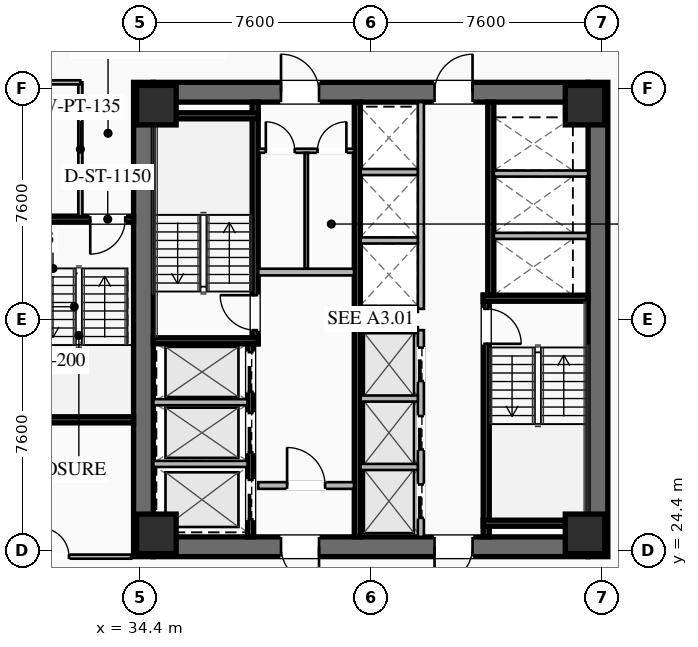
"""IFC4 building model, lengths in metres.
Left out: names, types, materials, properties, quantities, classifications, styles, units other than length and angle.
Written with IfcOpenShell. Run it as: python <this file> out.ifc"""

import sys

from ifc_helpers import new_model, si_unit, direction, frame, frame_2d, origin, origin_2d, place, context, subcontext, project, spatial, rectangle, hollow_rectangle, extrude, element, fill, save


model = new_model("IFC4")
c1 = context("Model", 3, precision=1e-05, world=origin(), true_north=direction((0.0, 1.0)))
c2 = subcontext(c1, "Body", "Model", "MODEL_VIEW")
j1 = project(units=[si_unit("LENGTHUNIT", "METRE"), si_unit("PLANEANGLEUNIT", "RADIAN")], contexts=[c1])
p1 = place(None, origin())
s1 = spatial("IfcSite", under=j1, at=p1, CompositionType="ELEMENT")
p2 = place(p1, origin())
s2 = spatial("IfcBuilding", under=s1, at=p2, CompositionType="ELEMENT")
p3 = place(p2, frame((0.0, 0.0, 38.8)))
s3 = spatial("IfcBuildingStorey", under=s2, at=p3, CompositionType="ELEMENT", Elevation=38.8)
for number, where, z_axis, x_axis in (
    (1, (34.525, 24.2, 0.0), (0.0, 0.0, 1.0), (0.0, 1.0, 0.0)),
    (2, (49.475, 39.8, 0.0), (0.0, 0.0, 1.0), (0.0, -1.0, 0.0)),
):
    element("IfcWall", number, at=place(p3, frame(where, z_axis=z_axis, x_axis=x_axis)), inside=s3, PredefinedType="SHEAR", context=c2, shape_type="SweptSolid", body=[
        extrude(rectangle(XDim=15.6, YDim=0.65, at=frame_2d((7.8, 0.0))), origin(), (0.0, 0.0, 1.0), 3.55),
    ])
p4 = place(p3, frame((49.15, 24.525, 0.0), z_axis=(0.0, 0.0, 1.0), x_axis=(-1.0, 0.0, 0.0)))
e3 = element("IfcWall", 3, at=p4, inside=s3, PredefinedType="SHEAR", context=c2, shape_type="SweptSolid", body=[
    extrude(rectangle(XDim=14.3, YDim=0.65, at=frame_2d((7.15, 0.0))), origin(), (0.0, 0.0, 1.0), 3.55),
])
p5 = place(p4, frame((8.85, 0.0, 0.0)))
e4 = element("IfcOpeningElement", 4, at=p5, cuts=e3, PredefinedType="OPENING", context=c2, shape_type="SweptSolid", body=[
    extrude(rectangle(XDim=1.25, YDim=2.25, at=frame_2d((0.625, 1.125))), frame((0.0, 0.335, 0.0), z_axis=(0.0, -1.0, 0.0), x_axis=(1.0, 0.0, 0.0)), (0.0, 0.0, 1.0), 0.67),
])
p6 = place(p4, frame((3.8, 0.0, 0.0)))
e5 = element("IfcOpeningElement", 5, at=p6, cuts=e3, PredefinedType="OPENING", context=c2, shape_type="SweptSolid", body=[
    extrude(rectangle(XDim=1.25, YDim=2.25, at=frame_2d((0.625, 1.125))), frame((0.0, 0.335, 0.0), z_axis=(0.0, -1.0, 0.0), x_axis=(1.0, 0.0, 0.0)), (0.0, 0.0, 1.0), 0.67),
])
p7 = place(p3, frame((34.85, 39.475, 0.0), z_axis=(0.0, 0.0, 1.0), x_axis=(1.0, 0.0, 0.0)))
e6 = element("IfcWall", 6, at=p7, inside=s3, PredefinedType="SHEAR", context=c2, shape_type="SweptSolid", body=[
    extrude(rectangle(XDim=14.3, YDim=0.65, at=frame_2d((7.15, 0.0))), origin(), (0.0, 0.0, 1.0), 3.55),
])
p8 = place(p7, frame((4.2, 0.0, 0.0)))
e7 = element("IfcOpeningElement", 7, at=p8, cuts=e6, PredefinedType="OPENING", context=c2, shape_type="SweptSolid", body=[
    extrude(rectangle(XDim=1.25, YDim=2.25, at=frame_2d((0.625, 1.125))), frame((0.0, 0.335, 0.0), z_axis=(0.0, -1.0, 0.0), x_axis=(1.0, 0.0, 0.0)), (0.0, 0.0, 1.0), 0.67),
])
p9 = place(p7, frame((9.25, 0.0, 0.0)))
e8 = element("IfcOpeningElement", 8, at=p9, cuts=e6, PredefinedType="OPENING", context=c2, shape_type="SweptSolid", body=[
    extrude(rectangle(XDim=1.25, YDim=2.25, at=frame_2d((0.625, 1.125))), frame((0.0, 0.335, 0.0), z_axis=(0.0, -1.0, 0.0), x_axis=(1.0, 0.0, 0.0)), (0.0, 0.0, 1.0), 0.67),
])
for number, where, z_axis, x_axis in (
    (9, (34.95, 24.95, 0.0), (0.0, 0.0, 1.0), (1.0, 0.0, 0.0)),
    (10, (49.05, 24.95, 0.0), (0.0, 0.0, 1.0), (1.0, 0.0, 0.0)),
    (11, (49.05, 39.05, 0.0), (0.0, 0.0, 1.0), (1.0, 0.0, 0.0)),
    (12, (34.95, 39.05, 0.0), (0.0, 0.0, 1.0), (1.0, 0.0, 0.0)),
):
    element("IfcColumn", number, at=place(p3, frame(where, z_axis=z_axis, x_axis=x_axis)), inside=s3, PredefinedType="COLUMN", context=c2, shape_type="SweptSolid", body=[
        extrude(hollow_rectangle(XDim=1.3, YDim=1.3, WallThickness=0.05, at=origin_2d()), origin(), (0.0, 0.0, 1.0), 3.35),
    ])
p10 = place(p3, frame((38.2, 31.2, 0.0), z_axis=(0.0, 0.0, 1.0), x_axis=(0.0, 1.0, 0.0)))
e13 = element("IfcWall", 13, at=p10, inside=s3, PredefinedType="SHEAR", context=c2, shape_type="SweptSolid", body=[
    extrude(rectangle(XDim=7.95, YDim=0.2, at=frame_2d((3.975, 0.0))), origin(), (0.0, 0.0, 1.0), 3.35),
])
p11 = place(p10, frame((0.45, 0.0, 0.0)))
e14 = element("IfcOpeningElement", 14, at=p11, cuts=e13, PredefinedType="OPENING", context=c2, shape_type="SweptSolid", body=[
    extrude(rectangle(XDim=1.15, YDim=2.2, at=frame_2d((0.575, 1.1))), frame((0.0, 0.11, 0.0), z_axis=(0.0, -1.0, 0.0), x_axis=(1.0, 0.0, 0.0)), (0.0, 0.0, 1.0), 0.22),
])
for number, where, z_axis, x_axis in (
    (15, (34.85, 31.3, 0.0), (0.0, 0.0, 1.0), (1.0, 0.0, 0.0)),
    (16, (34.85, 38.7, 0.0), (0.0, 0.0, 1.0), (1.0, 0.0, 0.0)),
):
    element("IfcWall", number, at=place(p3, frame(where, z_axis=z_axis, x_axis=x_axis)), inside=s3, PredefinedType="SHEAR", context=c2, shape_type="SweptSolid", body=[
        extrude(rectangle(XDim=3.45, YDim=0.2, at=frame_2d((1.725, 0.0))), origin(), (0.0, 0.0, 1.0), 3.35),
    ])
p12 = place(p3, frame((45.8, 32.8, 0.0), z_axis=(0.0, 0.0, 1.0), x_axis=(0.0, -1.0, 0.0)))
e17 = element("IfcWall", 17, at=p12, inside=s3, PredefinedType="SHEAR", context=c2, shape_type="SweptSolid", body=[
    extrude(rectangle(XDim=7.95, YDim=0.2, at=frame_2d((3.975, 0.0))), origin(), (0.0, 0.0, 1.0), 3.35),
])
p13 = place(p12, frame((0.45, 0.0, 0.0)))
e18 = element("IfcOpeningElement", 18, at=p13, cuts=e17, PredefinedType="OPENING", context=c2, shape_type="SweptSolid", body=[
    extrude(rectangle(XDim=1.15, YDim=2.2, at=frame_2d((0.575, 1.1))), frame((0.0, 0.11, 0.0), z_axis=(0.0, -1.0, 0.0), x_axis=(1.0, 0.0, 0.0)), (0.0, 0.0, 1.0), 0.22),
])
for number, where, z_axis, x_axis in (
    (19, (45.7, 32.7, 0.0), (0.0, 0.0, 1.0), (1.0, 0.0, 0.0)),
    (20, (45.7, 25.3, 0.0), (0.0, 0.0, 1.0), (1.0, 0.0, 0.0)),
):
    element("IfcWall", number, at=place(p3, frame(where, z_axis=z_axis, x_axis=x_axis)), inside=s3, PredefinedType="SHEAR", context=c2, shape_type="SweptSolid", body=[
        extrude(rectangle(XDim=3.45, YDim=0.2, at=frame_2d((1.725, 0.0))), origin(), (0.0, 0.0, 1.0), 3.35),
    ])
p14 = place(p3, frame((41.56, 24.85, 0.0), z_axis=(0.0, 0.0, 1.0), x_axis=(0.0, 1.0, 0.0)))
e21 = element("IfcWall", 21, at=p14, inside=s3, PredefinedType="SHEAR", context=c2, shape_type="SweptSolid", body=[
    extrude(rectangle(XDim=14.3, YDim=0.2, at=frame_2d((7.15, 0.0))), origin(), (0.0, 0.0, 1.0), 3.35),
])
p15 = place(p3, frame((38.3, 33.56, 0.0), z_axis=(0.0, 0.0, 1.0), x_axis=(1.0, 0.0, 0.0)))
e22 = element("IfcWall", 22, at=p15, inside=s3, PredefinedType="SOLIDWALL", context=c2, shape_type="SweptSolid", body=[
    extrude(rectangle(XDim=3.15, YDim=0.22, at=frame_2d((1.575, 0.0))), origin(), (0.0, 0.0, 1.0), 2.703),
])
p16 = place(p3, frame((38.3, 26.54, 0.0), z_axis=(0.0, 0.0, 1.0), x_axis=(1.0, 0.0, 0.0)))
e23 = element("IfcWall", 23, at=p16, inside=s3, PredefinedType="SOLIDWALL", context=c2, shape_type="SweptSolid", body=[
    extrude(rectangle(XDim=3.15, YDim=0.22, at=frame_2d((1.575, 0.0))), origin(), (0.0, 0.0, 1.0), 2.703),
])
p17 = place(p16, frame((0.95, 0.0, 0.0)))
e24 = element("IfcOpeningElement", 24, at=p17, cuts=e23, PredefinedType="OPENING", context=c2, shape_type="SweptSolid", body=[
    extrude(rectangle(XDim=1.25, YDim=2.25, at=frame_2d((0.625, 1.125))), frame((0.0, 0.12, 0.0), z_axis=(0.0, -1.0, 0.0), x_axis=(1.0, 0.0, 0.0)), (0.0, 0.0, 1.0), 0.24),
])
p18 = place(p3, frame((38.05, 24.85, 0.0), z_axis=(0.0, 0.0, 1.0), x_axis=(0.0, 1.0, 0.0)))
e25 = element("IfcWall", 25, at=p18, inside=s3, PredefinedType="SHEAR", context=c2, shape_type="SweptSolid", body=[
    extrude(rectangle(XDim=6.35, YDim=0.2, at=frame_2d((3.175, 0.0))), origin(), (0.0, 0.0, 1.0), 3.35),
])
p19 = place(p18, frame((4.775, 0.0, 0.0)))
e26 = element("IfcOpeningElement", 26, at=p19, cuts=e25, PredefinedType="OPENING", context=c2, shape_type="SweptSolid", body=[
    extrude(rectangle(XDim=1.3, YDim=2.25, at=frame_2d((0.65, 1.125))), frame((0.0, 0.11, 0.0), z_axis=(0.0, -1.0, 0.0), x_axis=(1.0, 0.0, 0.0)), (0.0, 0.0, 1.0), 0.22),
])
p20 = place(p18, frame((2.775, 0.0, 0.0)))
e27 = element("IfcOpeningElement", 27, at=p20, cuts=e25, PredefinedType="OPENING", context=c2, shape_type="SweptSolid", body=[
    extrude(rectangle(XDim=1.3, YDim=2.25, at=frame_2d((0.65, 1.125))), frame((0.0, 0.11, 0.0), z_axis=(0.0, -1.0, 0.0), x_axis=(1.0, 0.0, 0.0)), (0.0, 0.0, 1.0), 0.22),
])
p21 = place(p18, frame((0.575, 0.0, 0.0)))
e28 = element("IfcOpeningElement", 28, at=p21, cuts=e25, PredefinedType="OPENING", context=c2, shape_type="SweptSolid", body=[
    extrude(rectangle(XDim=1.3, YDim=2.25, at=frame_2d((0.65, 1.125))), frame((0.0, 0.11, 0.0), z_axis=(0.0, -1.0, 0.0), x_axis=(1.0, 0.0, 0.0)), (0.0, 0.0, 1.0), 0.22),
])
for number, where, z_axis, x_axis in (
    (29, (34.85, 27.25, 0.0), (0.0, 0.0, 1.0), (1.0, 0.0, 0.0)),
    (30, (34.85, 29.28, 0.0), (0.0, 0.0, 1.0), (1.0, 0.0, 0.0)),
):
    element("IfcWall", number, at=place(p3, frame(where, z_axis=z_axis, x_axis=x_axis)), inside=s3, PredefinedType="SOLIDWALL", context=c2, shape_type="SweptSolid", body=[
        extrude(rectangle(XDim=3.1, YDim=0.2, at=frame_2d((1.55, 0.0))), origin(), (0.0, 0.0, 1.0), 3.35),
    ])
p22 = place(p3, frame((45.95, 39.15, 0.0), z_axis=(0.0, 0.0, 1.0), x_axis=(0.0, -1.0, 0.0)))
e31 = element("IfcWall", 31, at=p22, inside=s3, PredefinedType="SHEAR", context=c2, shape_type="SweptSolid", body=[
    extrude(rectangle(XDim=6.35, YDim=0.2, at=frame_2d((3.175, 0.0))), origin(), (0.0, 0.0, 1.0), 3.35),
])
for number, where, z_axis, x_axis in (
    (32, (46.05, 34.75, 0.0), (0.0, 0.0, 1.0), (1.0, 0.0, 0.0)),
    (33, (46.05, 36.8, 0.0), (0.0, 0.0, 1.0), (1.0, 0.0, 0.0)),
):
    element("IfcWall", number, at=place(p3, frame(where, z_axis=z_axis, x_axis=x_axis)), inside=s3, PredefinedType="SOLIDWALL", context=c2, shape_type="SweptSolid", body=[
        extrude(rectangle(XDim=3.1, YDim=0.2, at=frame_2d((1.55, 0.0))), origin(), (0.0, 0.0, 1.0), 3.35),
    ])
p23 = place(p3, frame((38.3, 37.55, 0.0), z_axis=(0.0, 0.0, 1.0), x_axis=(1.0, 0.0, 0.0)))
e34 = element("IfcWall", 34, at=p23, inside=s3, PredefinedType="PARTITIONING", context=c2, shape_type="SweptSolid", body=[
    extrude(rectangle(XDim=3.15, YDim=0.135, at=frame_2d((1.575, 0.0))), origin(), (0.0, 0.0, 1.0), 2.703),
])
p24 = place(p23, frame((0.25, 0.0, 0.0)))
e35 = element("IfcOpeningElement", 35, at=p24, cuts=e34, PredefinedType="OPENING", context=c2, shape_type="SweptSolid", body=[
    extrude(rectangle(XDim=0.95, YDim=2.05, at=frame_2d((0.475, 1.025))), frame((0.0, 0.077, 0.0), z_axis=(0.0, -1.0, 0.0), x_axis=(1.0, 0.0, 0.0)), (0.0, 0.0, 1.0), 0.155),
])
p25 = place(p23, frame((1.95, 0.0, 0.0)))
e36 = element("IfcOpeningElement", 36, at=p25, cuts=e34, PredefinedType="OPENING", context=c2, shape_type="SweptSolid", body=[
    extrude(rectangle(XDim=0.95, YDim=2.05, at=frame_2d((0.475, 1.025))), frame((0.0, 0.077, 0.0), z_axis=(0.0, -1.0, 0.0), x_axis=(1.0, 0.0, 0.0)), (0.0, 0.0, 1.0), 0.155),
])
p26 = place(p3, frame((39.88, 33.68, 0.0), z_axis=(0.0, 0.0, 1.0), x_axis=(0.0, 1.0, 0.0)))
e37 = element("IfcWall", 37, at=p26, inside=s3, PredefinedType="PARTITIONING", context=c2, shape_type="SweptSolid", body=[
    extrude(rectangle(XDim=3.8, YDim=0.11, at=frame_2d((1.9, 0.0))), origin(), (0.0, 0.0, 1.0), 2.703),
])
p27 = place(p3, frame((43.65, 24.85, 0.0), z_axis=(0.0, 0.0, 1.0), x_axis=(0.0, 1.0, 0.0)))
e38 = element("IfcWall", 38, at=p27, inside=s3, PredefinedType="SOLIDWALL", context=c2, shape_type="SweptSolid", body=[
    extrude(rectangle(XDim=6.8, YDim=0.2, at=frame_2d((3.4, 0.0))), origin(), (0.0, 0.0, 1.0), 3.35),
])
p28 = place(p27, frame((0.625, 0.0, 0.0)))
e39 = element("IfcOpeningElement", 39, at=p28, cuts=e38, PredefinedType="OPENING", context=c2, shape_type="SweptSolid", body=[
    extrude(rectangle(XDim=1.1, YDim=2.2, at=frame_2d((0.55, 1.1))), frame((0.0, 0.11, 0.0), z_axis=(0.0, -1.0, 0.0), x_axis=(1.0, 0.0, 0.0)), (0.0, 0.0, 1.0), 0.22),
])
p29 = place(p27, frame((2.875, 0.0, 0.0)))
e40 = element("IfcOpeningElement", 40, at=p29, cuts=e38, PredefinedType="OPENING", context=c2, shape_type="SweptSolid", body=[
    extrude(rectangle(XDim=1.1, YDim=2.2, at=frame_2d((0.55, 1.1))), frame((0.0, 0.11, 0.0), z_axis=(0.0, -1.0, 0.0), x_axis=(1.0, 0.0, 0.0)), (0.0, 0.0, 1.0), 0.22),
])
p30 = place(p27, frame((5.125, 0.0, 0.0)))
e41 = element("IfcOpeningElement", 41, at=p30, cuts=e38, PredefinedType="OPENING", context=c2, shape_type="SweptSolid", body=[
    extrude(rectangle(XDim=1.1, YDim=2.2, at=frame_2d((0.55, 1.1))), frame((0.0, 0.11, 0.0), z_axis=(0.0, -1.0, 0.0), x_axis=(1.0, 0.0, 0.0)), (0.0, 0.0, 1.0), 0.22),
])
for number, where, z_axis, x_axis in (
    (42, (41.67, 27.15, 0.0), (0.0, 0.0, 1.0), (1.0, 0.0, 0.0)),
    (43, (41.67, 29.4, 0.0), (0.0, 0.0, 1.0), (1.0, 0.0, 0.0)),
    (44, (41.67, 31.65, 0.0), (0.0, 0.0, 1.0), (1.0, 0.0, 0.0)),
):
    element("IfcWall", number, at=place(p3, frame(where, z_axis=z_axis, x_axis=x_axis)), inside=s3, PredefinedType="SOLIDWALL", context=c2, shape_type="SweptSolid", body=[
        extrude(rectangle(XDim=1.88, YDim=0.2, at=frame_2d((0.94, 0.0))), origin(), (0.0, 0.0, 1.0), 3.35),
    ])
p31 = place(p3, frame((43.65, 32.35, 0.0), z_axis=(0.0, 0.0, 1.0), x_axis=(0.0, 1.0, 0.0)))
e45 = element("IfcWall", 45, at=p31, inside=s3, PredefinedType="SOLIDWALL", context=c2, shape_type="SweptSolid", body=[
    extrude(rectangle(XDim=6.8, YDim=0.2, at=frame_2d((3.4, 0.0))), origin(), (0.0, 0.0, 1.0), 3.35),
])
for number, where, z_axis, x_axis in (
    (46, (41.67, 32.35, 0.0), (0.0, 0.0, 1.0), (1.0, 0.0, 0.0)),
    (47, (41.67, 34.6, 0.0), (0.0, 0.0, 1.0), (1.0, 0.0, 0.0)),
    (48, (41.67, 36.85, 0.0), (0.0, 0.0, 1.0), (1.0, 0.0, 0.0)),
):
    element("IfcWall", number, at=place(p3, frame(where, z_axis=z_axis, x_axis=x_axis)), inside=s3, PredefinedType="SOLIDWALL", context=c2, shape_type="SweptSolid", body=[
        extrude(rectangle(XDim=1.88, YDim=0.2, at=frame_2d((0.94, 0.0))), origin(), (0.0, 0.0, 1.0), 3.35),
    ])
p32 = place(p3, frame((34.2, 35.3, 0.0), z_axis=(0.0, 0.0, 1.0), x_axis=(-1.0, 0.0, 0.0)))
e49 = element("IfcWall", 49, at=p32, inside=s3, PredefinedType="SHEAR", context=c2, shape_type="SweptSolid", body=[
    extrude(rectangle(XDim=3.4, YDim=0.2, at=frame_2d((1.7, 0.0))), origin(), (0.0, 0.0, 1.0), 3.35),
])
p33 = place(p32, frame((0.275, 0.0, 0.0)))
e50 = element("IfcOpeningElement", 50, at=p33, cuts=e49, PredefinedType="OPENING", context=c2, shape_type="SweptSolid", body=[
    extrude(rectangle(XDim=1.15, YDim=2.2, at=frame_2d((0.575, 1.1))), frame((0.0, 0.11, 0.0), z_axis=(0.0, -1.0, 0.0), x_axis=(1.0, 0.0, 0.0)), (0.0, 0.0, 1.0), 0.22),
])
p34 = place(p3, frame((30.8, 28.7, 0.0), z_axis=(0.0, 0.0, 1.0), x_axis=(1.0, 0.0, 0.0)))
e51 = element("IfcWall", 51, at=p34, inside=s3, PredefinedType="SHEAR", context=c2, shape_type="SweptSolid", body=[
    extrude(rectangle(XDim=3.4, YDim=0.2, at=frame_2d((1.7, 0.0))), origin(), (0.0, 0.0, 1.0), 3.35),
])
p35 = place(p3, frame((32.45, 35.4, 0.0), z_axis=(0.0, 0.0, 1.0), x_axis=(0.0, 1.0, 0.0)))
e52 = element("IfcWall", 52, at=p35, inside=s3, PredefinedType="PARTITIONING", context=c2, shape_type="SweptSolid", body=[
    extrude(rectangle(XDim=4.4, YDim=0.135, at=frame_2d((2.2, 0.0))), origin(), (0.0, 0.0, 1.0), 2.703),
])
p36 = place(p3, frame((32.45, 39.8, 0.0), z_axis=(0.0, 0.0, 1.0), x_axis=(-1.0, 0.0, 0.0)))
e53 = element("IfcWall", 53, at=p36, inside=s3, PredefinedType="PARTITIONING", context=c2, shape_type="SweptSolid", body=[
    extrude(rectangle(XDim=13.33, YDim=0.135, at=frame_2d((6.665, 0.0))), origin(), (0.0, 0.0, 1.0), 2.703),
])
p37 = place(p36, frame((5.84, 0.0, 0.0)))
e54 = element("IfcOpeningElement", 54, at=p37, cuts=e53, PredefinedType="OPENING", context=c2, shape_type="SweptSolid", body=[
    extrude(rectangle(XDim=0.95, YDim=2.05, at=frame_2d((0.475, 1.025))), frame((0.0, 0.077, 0.0), z_axis=(0.0, -1.0, 0.0), x_axis=(1.0, 0.0, 0.0)), (0.0, 0.0, 1.0), 0.155),
])
p38 = place(p3, frame((19.12, 24.2, 0.0), z_axis=(0.0, 0.0, 1.0), x_axis=(1.0, 0.0, 0.0)))
e55 = element("IfcWall", 55, at=p38, inside=s3, PredefinedType="PARTITIONING", context=c2, shape_type="SweptSolid", body=[
    extrude(rectangle(XDim=15.0, YDim=0.135, at=frame_2d((7.5, 0.0))), origin(), (0.0, 0.0, 1.0), 2.703),
])
p39 = place(p38, frame((12.005, 0.0, 0.0)))
e56 = element("IfcOpeningElement", 56, at=p39, cuts=e55, PredefinedType="OPENING", context=c2, shape_type="SweptSolid", body=[
    extrude(rectangle(XDim=0.95, YDim=2.05, at=frame_2d((0.475, 1.025))), frame((0.0, 0.077, 0.0), z_axis=(0.0, -1.0, 0.0), x_axis=(1.0, 0.0, 0.0)), (0.0, 0.0, 1.0), 0.155),
])
p40 = place(p8, origin())
e57 = element("IfcDoor", 57, at=p40, inside=s3, OperationType="SINGLE_SWING_LEFT", PredefinedType="DOOR", context=c2, shape_type="SweptSolid", body=[
    extrude(rectangle(XDim=1.25, YDim=2.25, at=frame_2d((0.625, 1.125))), frame((0.0, 0.025, 0.0), z_axis=(0.0, -1.0, 0.0), x_axis=(1.0, 0.0, 0.0)), (0.0, 0.0, 1.0), 0.05),
])
fill(e7, e57)
p41 = place(p9, origin())
e58 = element("IfcDoor", 58, at=p41, inside=s3, OperationType="SINGLE_SWING_RIGHT", PredefinedType="DOOR", context=c2, shape_type="SweptSolid", body=[
    extrude(rectangle(XDim=1.25, YDim=2.25, at=frame_2d((0.625, 1.125))), frame((0.0, 0.025, 0.0), z_axis=(0.0, -1.0, 0.0), x_axis=(1.0, 0.0, 0.0)), (0.0, 0.0, 1.0), 0.05),
])
fill(e8, e58)
p42 = place(p5, origin())
e59 = element("IfcDoor", 59, at=p42, inside=s3, OperationType="SINGLE_SWING_LEFT", PredefinedType="DOOR", context=c2, shape_type="SweptSolid", body=[
    extrude(rectangle(XDim=1.25, YDim=2.25, at=frame_2d((0.625, 1.125))), frame((0.0, 0.025, 0.0), z_axis=(0.0, -1.0, 0.0), x_axis=(1.0, 0.0, 0.0)), (0.0, 0.0, 1.0), 0.05),
])
fill(e4, e59)
p43 = place(p6, origin())
e60 = element("IfcDoor", 60, at=p43, inside=s3, OperationType="SINGLE_SWING_RIGHT", PredefinedType="DOOR", context=c2, shape_type="SweptSolid", body=[
    extrude(rectangle(XDim=1.25, YDim=2.25, at=frame_2d((0.625, 1.125))), frame((0.0, 0.025, 0.0), z_axis=(0.0, -1.0, 0.0), x_axis=(1.0, 0.0, 0.0)), (0.0, 0.0, 1.0), 0.05),
])
fill(e5, e60)
p44 = place(p11, origin())
e61 = element("IfcDoor", 61, at=p44, inside=s3, OperationType="SINGLE_SWING_RIGHT", PredefinedType="DOOR", context=c2, shape_type="SweptSolid", body=[
    extrude(rectangle(XDim=1.15, YDim=2.2, at=frame_2d((0.575, 1.1))), frame((0.0, 0.025, 0.0), z_axis=(0.0, -1.0, 0.0), x_axis=(1.0, 0.0, 0.0)), (0.0, 0.0, 1.0), 0.05),
])
fill(e14, e61)
p45 = place(p13, origin())
e62 = element("IfcDoor", 62, at=p45, inside=s3, OperationType="SINGLE_SWING_RIGHT", PredefinedType="DOOR", context=c2, shape_type="SweptSolid", body=[
    extrude(rectangle(XDim=1.15, YDim=2.2, at=frame_2d((0.575, 1.1))), frame((0.0, 0.025, 0.0), z_axis=(0.0, -1.0, 0.0), x_axis=(1.0, 0.0, 0.0)), (0.0, 0.0, 1.0), 0.05),
])
fill(e18, e62)
p46 = place(p17, origin())
e63 = element("IfcDoor", 63, at=p46, inside=s3, OperationType="SINGLE_SWING_LEFT", PredefinedType="DOOR", context=c2, shape_type="SweptSolid", body=[
    extrude(rectangle(XDim=1.25, YDim=2.25, at=frame_2d((0.625, 1.125))), frame((0.0, 0.025, 0.0), z_axis=(0.0, -1.0, 0.0), x_axis=(1.0, 0.0, 0.0)), (0.0, 0.0, 1.0), 0.05),
])
fill(e24, e63)
p47 = place(p24, origin())
e64 = element("IfcDoor", 64, at=p47, inside=s3, OperationType="SINGLE_SWING_LEFT", PredefinedType="DOOR", context=c2, shape_type="SweptSolid", body=[
    extrude(rectangle(XDim=0.95, YDim=2.05, at=frame_2d((0.475, 1.025))), frame((0.0, 0.025, 0.0), z_axis=(0.0, -1.0, 0.0), x_axis=(1.0, 0.0, 0.0)), (0.0, 0.0, 1.0), 0.05),
])
fill(e35, e64)
p48 = place(p25, origin())
e65 = element("IfcDoor", 65, at=p48, inside=s3, OperationType="SINGLE_SWING_RIGHT", PredefinedType="DOOR", context=c2, shape_type="SweptSolid", body=[
    extrude(rectangle(XDim=0.95, YDim=2.05, at=frame_2d((0.475, 1.025))), frame((0.0, 0.025, 0.0), z_axis=(0.0, -1.0, 0.0), x_axis=(1.0, 0.0, 0.0)), (0.0, 0.0, 1.0), 0.05),
])
fill(e36, e65)
p49 = place(p33, origin())
e66 = element("IfcDoor", 66, at=p49, inside=s3, OperationType="SINGLE_SWING_RIGHT", PredefinedType="DOOR", context=c2, shape_type="SweptSolid", body=[
    extrude(rectangle(XDim=1.15, YDim=2.2, at=frame_2d((0.575, 1.1))), frame((0.0, 0.025, 0.0), z_axis=(0.0, -1.0, 0.0), x_axis=(1.0, 0.0, 0.0)), (0.0, 0.0, 1.0), 0.05),
])
fill(e50, e66)
p50 = place(p39, origin())
e67 = element("IfcDoor", 67, at=p50, inside=s3, OperationType="SINGLE_SWING_LEFT", PredefinedType="DOOR", context=c2, shape_type="SweptSolid", body=[
    extrude(rectangle(XDim=0.95, YDim=2.05, at=frame_2d((0.475, 1.025))), frame((0.0, 0.025, 0.0), z_axis=(0.0, -1.0, 0.0), x_axis=(1.0, 0.0, 0.0)), (0.0, 0.0, 1.0), 0.05),
])
fill(e56, e67)
p51 = place(p19, origin())
e68 = element("IfcDoor", 68, at=p51, inside=s3, OperationType="SLIDING_TO_LEFT", PredefinedType="DOOR", context=c2, shape_type="SweptSolid", body=[
    extrude(rectangle(XDim=1.3, YDim=2.25, at=frame_2d((0.65, 1.125))), frame((0.0, 0.025, 0.0), z_axis=(0.0, -1.0, 0.0), x_axis=(1.0, 0.0, 0.0)), (0.0, 0.0, 1.0), 0.05),
])
fill(e26, e68)
p52 = place(p20, origin())
e69 = element("IfcDoor", 69, at=p52, inside=s3, OperationType="SLIDING_TO_LEFT", PredefinedType="DOOR", context=c2, shape_type="SweptSolid", body=[
    extrude(rectangle(XDim=1.3, YDim=2.25, at=frame_2d((0.65, 1.125))), frame((0.0, 0.025, 0.0), z_axis=(0.0, -1.0, 0.0), x_axis=(1.0, 0.0, 0.0)), (0.0, 0.0, 1.0), 0.05),
])
fill(e27, e69)
p53 = place(p21, origin())
e70 = element("IfcDoor", 70, at=p53, inside=s3, OperationType="SLIDING_TO_LEFT", PredefinedType="DOOR", context=c2, shape_type="SweptSolid", body=[
    extrude(rectangle(XDim=1.3, YDim=2.25, at=frame_2d((0.65, 1.125))), frame((0.0, 0.025, 0.0), z_axis=(0.0, -1.0, 0.0), x_axis=(1.0, 0.0, 0.0)), (0.0, 0.0, 1.0), 0.05),
])
fill(e28, e70)
p54 = place(p28, origin())
e71 = element("IfcDoor", 71, at=p54, inside=s3, OperationType="SLIDING_TO_LEFT", PredefinedType="DOOR", context=c2, shape_type="SweptSolid", body=[
    extrude(rectangle(XDim=1.1, YDim=2.2, at=frame_2d((0.55, 1.1))), frame((0.0, 0.025, 0.0), z_axis=(0.0, -1.0, 0.0), x_axis=(1.0, 0.0, 0.0)), (0.0, 0.0, 1.0), 0.05),
])
fill(e39, e71)
p55 = place(p29, origin())
e72 = element("IfcDoor", 72, at=p55, inside=s3, OperationType="SLIDING_TO_LEFT", PredefinedType="DOOR", context=c2, shape_type="SweptSolid", body=[
    extrude(rectangle(XDim=1.1, YDim=2.2, at=frame_2d((0.55, 1.1))), frame((0.0, 0.025, 0.0), z_axis=(0.0, -1.0, 0.0), x_axis=(1.0, 0.0, 0.0)), (0.0, 0.0, 1.0), 0.05),
])
fill(e40, e72)
p56 = place(p30, origin())
e73 = element("IfcDoor", 73, at=p56, inside=s3, OperationType="SLIDING_TO_LEFT", PredefinedType="DOOR", context=c2, shape_type="SweptSolid", body=[
    extrude(rectangle(XDim=1.1, YDim=2.2, at=frame_2d((0.55, 1.1))), frame((0.0, 0.025, 0.0), z_axis=(0.0, -1.0, 0.0), x_axis=(1.0, 0.0, 0.0)), (0.0, 0.0, 1.0), 0.05),
])
fill(e41, e73)
save(model, sys.argv[1])
